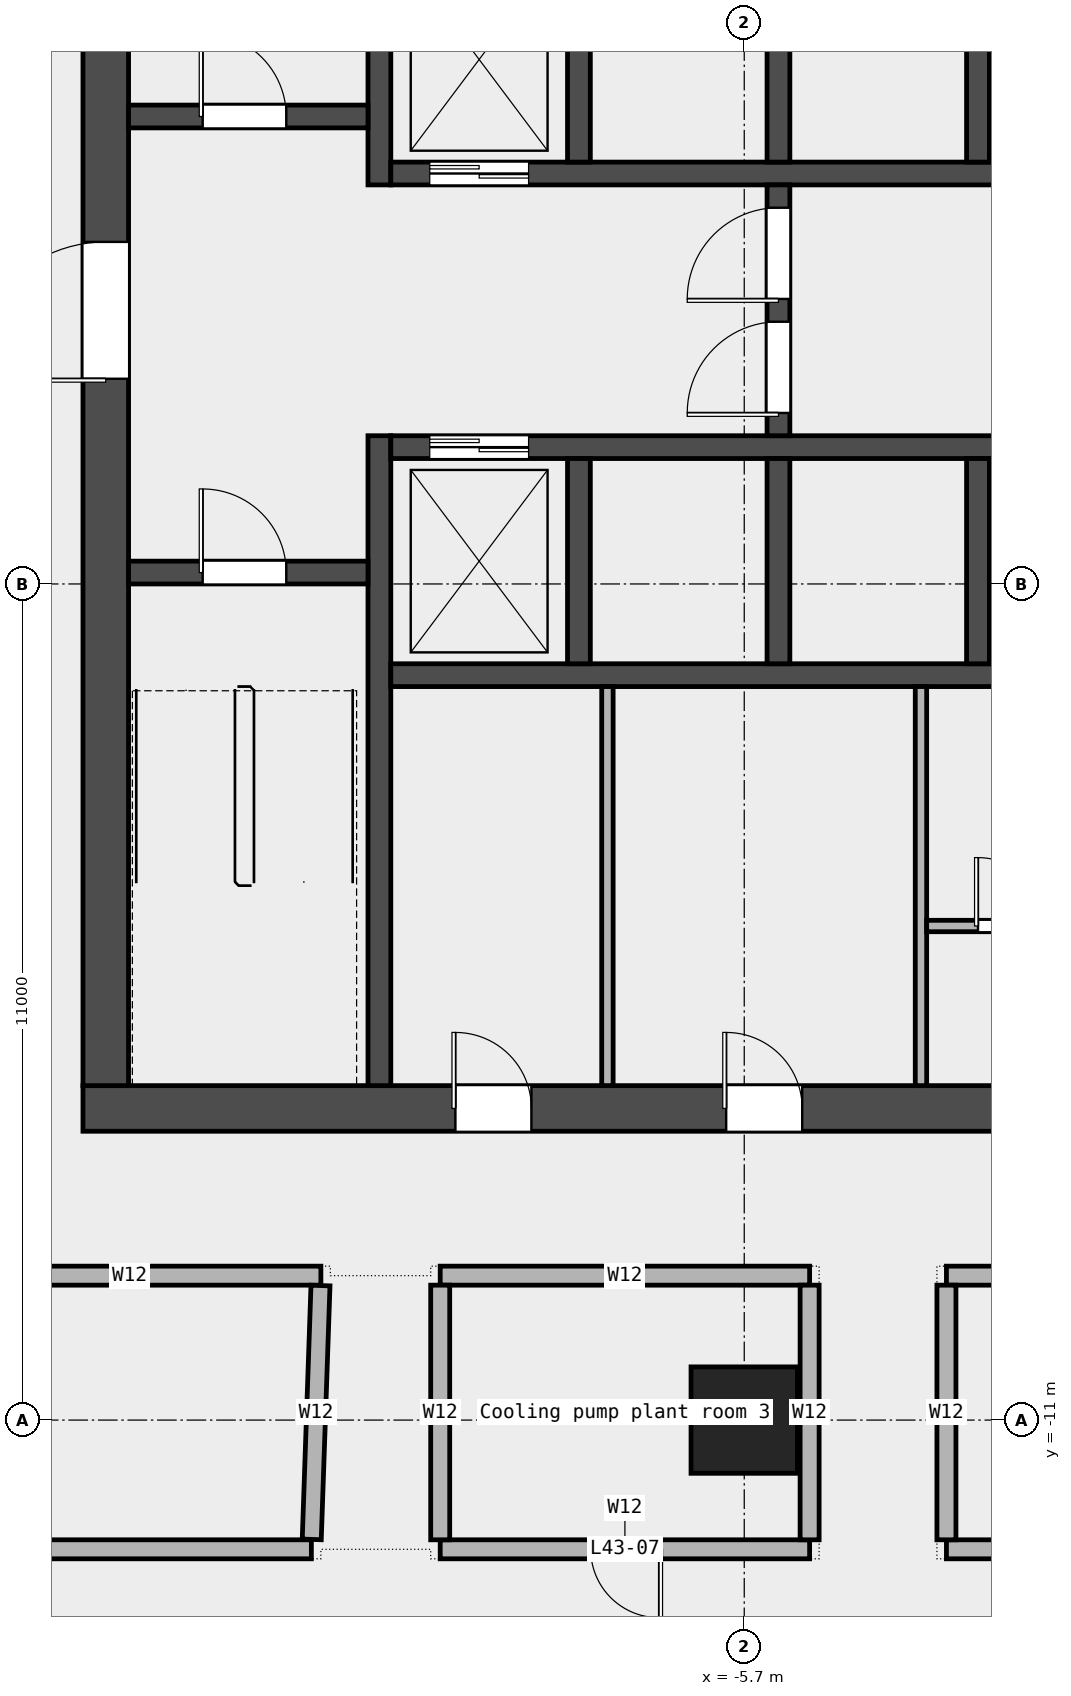
"""IFC4 building model, lengths in metres.
Left out: names, types, materials, properties, quantities, classifications, styles, units other than length and angle.
Written with IfcOpenShell. Run it as: python <this file> out.ifc"""

import sys

from ifc_helpers import new_model, si_unit, direction, frame, frame_2d, origin, origin_2d, place, context, subcontext, project, spatial, rectangle, extrude, element, fill, save


model = new_model("IFC4")
c1 = context("Model", 3, precision=1e-05, world=origin(), true_north=direction((0.0, 1.0)))
c2 = subcontext(c1, "Body", "Model", "MODEL_VIEW")
j1 = project(units=[si_unit("LENGTHUNIT", "METRE"), si_unit("PLANEANGLEUNIT", "RADIAN")], contexts=[c1])
p1 = place(None, origin())
s1 = spatial("IfcSite", under=j1, at=p1, CompositionType="ELEMENT")
p2 = place(p1, origin())
s2 = spatial("IfcBuilding", under=s1, at=p2, CompositionType="ELEMENT")
p3 = place(p2, frame((0.0, 0.0, 205.0)))
s3 = spatial("IfcBuildingStorey", under=s2, at=p3, CompositionType="ELEMENT", Elevation=205.0)
p4 = place(p3, frame((-5.7, -11.0, 0.0), z_axis=(0.0, 0.0, 1.0), x_axis=(1.0, 0.0, 0.0)))
e1 = element("IfcColumn", 1, at=p4, inside=s3, PredefinedType="COLUMN", context=c2, shape_type="SweptSolid", body=[
    extrude(rectangle(XDim=1.4, YDim=1.4, at=origin_2d()), origin(), (0.0, 0.0, 1.0), 5.6),
])
p5 = place(p3, frame((-24.45, -12.7, 0.0), z_axis=(0.0, 0.0, 1.0), x_axis=(1.0, 0.0, 0.0)))
e2 = element("IfcWall", 2, at=p5, inside=s3, PredefinedType="PARTITIONING", context=c2, shape_type="SweptSolid", body=[
    extrude(rectangle(XDim=13.055, YDim=0.25, at=frame_2d((6.527, 0.0))), origin(), (0.0, 0.0, 1.0), 5.6),
])
p6 = place(p5, frame((5.327, 0.0, 0.0)))
e3 = element("IfcOpeningElement", 3, at=p6, cuts=e2, PredefinedType="OPENING", context=c2, shape_type="SweptSolid", body=[
    extrude(rectangle(XDim=1.2, YDim=2.1, at=frame_2d((0.6, 1.05))), frame((0.0, 0.137, 0.0), z_axis=(0.0, -1.0, 0.0), x_axis=(1.0, 0.0, 0.0)), (0.0, 0.0, 1.0), 0.274),
])
p7 = place(p3, frame((-9.7, -12.7, 0.0), z_axis=(0.0, 0.0, 1.0), x_axis=(1.0, 0.0, 0.0)))
e4 = element("IfcWall", 4, at=p7, inside=s3, PredefinedType="PARTITIONING", context=c2, shape_type="SweptSolid", body=[
    extrude(rectangle(XDim=4.86, YDim=0.25, at=frame_2d((2.43, 0.0))), origin(), (0.0, 0.0, 1.0), 5.6),
])
p8 = place(p7, frame((1.98, 0.0, 0.0)))
e5 = element("IfcOpeningElement", 5, at=p8, cuts=e4, PredefinedType="OPENING", context=c2, shape_type="SweptSolid", body=[
    extrude(rectangle(XDim=0.9, YDim=2.1, at=frame_2d((0.45, 1.05))), frame((0.0, 0.137, 0.0), z_axis=(0.0, -1.0, 0.0), x_axis=(1.0, 0.0, 0.0)), (0.0, 0.0, 1.0), 0.274),
])
p9 = place(p3, frame((-3.04, -12.7, 0.0), z_axis=(0.0, 0.0, 1.0), x_axis=(1.0, 0.0, 0.0)))
e6 = element("IfcWall", 6, at=p9, inside=s3, PredefinedType="PARTITIONING", context=c2, shape_type="SweptSolid", body=[
    extrude(rectangle(XDim=12.74, YDim=0.25, at=frame_2d((6.37, 0.0))), origin(), (0.0, 0.0, 1.0), 5.6),
])
p10 = place(p3, frame((-16.3, -9.1, 0.0), z_axis=(0.0, 0.0, 1.0), x_axis=(1.0, 0.0, 0.0)))
e7 = element("IfcWall", 7, at=p10, inside=s3, PredefinedType="PARTITIONING", context=c2, shape_type="SweptSolid", body=[
    extrude(rectangle(XDim=5.03, YDim=0.25, at=frame_2d((2.515, 0.0))), origin(), (0.0, 0.0, 1.0), 5.6),
])
p11 = place(p3, frame((-9.7, -9.1, 0.0), z_axis=(0.0, 0.0, 1.0), x_axis=(1.0, 0.0, 0.0)))
e8 = element("IfcWall", 8, at=p11, inside=s3, PredefinedType="PARTITIONING", context=c2, shape_type="SweptSolid", body=[
    extrude(rectangle(XDim=4.86, YDim=0.25, at=frame_2d((2.43, 0.0))), origin(), (0.0, 0.0, 1.0), 5.6),
])
p12 = place(p3, frame((-3.04, -9.1, 0.0), z_axis=(0.0, 0.0, 1.0), x_axis=(1.0, 0.0, 0.0)))
e9 = element("IfcWall", 9, at=p12, inside=s3, PredefinedType="PARTITIONING", context=c2, shape_type="SweptSolid", body=[
    extrude(rectangle(XDim=12.74, YDim=0.25, at=frame_2d((6.37, 0.0))), origin(), (0.0, 0.0, 1.0), 5.6),
])
p13 = place(p12, frame((5.77, 0.0, 0.0)))
e10 = element("IfcOpeningElement", 10, at=p13, cuts=e9, PredefinedType="OPENING", context=c2, shape_type="SweptSolid", body=[
    extrude(rectangle(XDim=1.2, YDim=2.1, at=frame_2d((0.6, 1.05))), frame((0.0, 0.137, 0.0), z_axis=(0.0, -1.0, 0.0), x_axis=(1.0, 0.0, 0.0)), (0.0, 0.0, 1.0), 0.274),
])
for number, where, z_axis, x_axis in (
    (11, (-9.7, -12.575, 0.0), (0.0, 0.0, 1.0), (0.0, 1.0, 0.0)),
    (12, (-4.84, -12.575, 0.0), (0.0, 0.0, 1.0), (0.0, 1.0, 0.0)),
    (13, (-3.04, -12.575, 0.0), (0.0, 0.0, 1.0), (0.0, 1.0, 0.0)),
):
    element("IfcWall", number, at=place(p3, frame(where, z_axis=z_axis, x_axis=x_axis)), inside=s3, PredefinedType="PARTITIONING", context=c2, shape_type="SweptSolid", body=[
        extrude(rectangle(XDim=3.35, YDim=0.25, at=frame_2d((1.675, 0.0))), origin(), (0.0, 0.0, 1.0), 5.6),
    ])
p14 = place(p3, frame((-11.275, -9.23, 0.0), z_axis=(0.0, 0.0, 1.0), x_axis=(-0.03440692376, -0.999407906511, 0.0)))
e14 = element("IfcWall", 14, at=p14, inside=s3, PredefinedType="PARTITIONING", context=c2, shape_type="SweptSolid", body=[
    extrude(rectangle(XDim=3.342, YDim=0.25, at=frame_2d((1.671, 0.0))), origin(), (0.0, 0.0, 1.0), 5.6),
])
p15 = place(p3, frame((-14.4, -6.9, 0.0), z_axis=(0.0, 0.0, 1.0), x_axis=(1.0, 0.0, 0.0)))
e15 = element("IfcWall", 15, at=p15, inside=s3, PredefinedType="SHEAR", context=c2, shape_type="SweptSolid", body=[
    extrude(rectangle(XDim=28.8, YDim=0.6, at=frame_2d((14.4, 0.0))), origin(), (0.0, 0.0, 1.0), 5.7),
])
p16 = place(p15, frame((4.9, 0.0, 0.0)))
e16 = element("IfcOpeningElement", 16, at=p16, cuts=e15, PredefinedType="OPENING", context=c2, shape_type="SweptSolid", body=[
    extrude(rectangle(XDim=1.0, YDim=2.1, at=frame_2d((0.5, 1.05))), frame((0.0, 0.312, 0.0), z_axis=(0.0, -1.0, 0.0), x_axis=(1.0, 0.0, 0.0)), (0.0, 0.0, 1.0), 0.624),
])
p17 = place(p15, frame((8.462, 0.0, 0.0)))
e17 = element("IfcOpeningElement", 17, at=p17, cuts=e15, PredefinedType="OPENING", context=c2, shape_type="SweptSolid", body=[
    extrude(rectangle(XDim=1.0, YDim=2.1, at=frame_2d((0.5, 1.05))), frame((0.0, 0.312, 0.0), z_axis=(0.0, -1.0, 0.0), x_axis=(1.0, 0.0, 0.0)), (0.0, 0.0, 1.0), 0.624),
])
p18 = place(p15, frame((13.425, 0.0, 0.0)))
e18 = element("IfcOpeningElement", 18, at=p18, cuts=e15, PredefinedType="OPENING", context=c2, shape_type="SweptSolid", body=[
    extrude(rectangle(XDim=1.2, YDim=2.1, at=frame_2d((0.6, 1.05))), frame((0.0, 0.312, 0.0), z_axis=(0.0, -1.0, 0.0), x_axis=(1.0, 0.0, 0.0)), (0.0, 0.0, 1.0), 0.624),
])
p19 = place(p15, frame((18.75, 0.0, 0.0)))
e19 = element("IfcOpeningElement", 19, at=p19, cuts=e15, PredefinedType="OPENING", context=c2, shape_type="SweptSolid", body=[
    extrude(rectangle(XDim=1.8, YDim=2.1, at=frame_2d((0.9, 1.05))), frame((0.0, 0.312, 0.0), z_axis=(0.0, -1.0, 0.0), x_axis=(1.0, 0.0, 0.0)), (0.0, 0.0, 1.0), 0.624),
])
p20 = place(p15, frame((23.087, 0.0, 0.0)))
e20 = element("IfcOpeningElement", 20, at=p20, cuts=e15, PredefinedType="OPENING", context=c2, shape_type="SweptSolid", body=[
    extrude(rectangle(XDim=1.0, YDim=2.1, at=frame_2d((0.5, 1.05))), frame((0.0, 0.312, 0.0), z_axis=(0.0, -1.0, 0.0), x_axis=(1.0, 0.0, 0.0)), (0.0, 0.0, 1.0), 0.624),
])
p21 = place(p3, frame((-14.1, -6.6, 0.0), z_axis=(0.0, 0.0, 1.0), x_axis=(0.0, 1.0, 0.0)))
e21 = element("IfcWall", 21, at=p21, inside=s3, PredefinedType="SHEAR", context=c2, shape_type="SweptSolid", body=[
    extrude(rectangle(XDim=19.5, YDim=0.6, at=frame_2d((9.75, 0.0))), origin(), (0.0, 0.0, 1.0), 5.7),
])
p22 = place(p21, frame((9.3, 0.0, 0.0)))
e22 = element("IfcOpeningElement", 22, at=p22, cuts=e21, PredefinedType="OPENING", context=c2, shape_type="SweptSolid", body=[
    extrude(rectangle(XDim=1.8, YDim=2.1, at=frame_2d((0.9, 1.05))), frame((0.0, 0.312, 0.0), z_axis=(0.0, -1.0, 0.0), x_axis=(1.0, 0.0, 0.0)), (0.0, 0.0, 1.0), 0.624),
])
p23 = place(p3, frame((-10.5, -6.6, 0.0), z_axis=(0.0, 0.0, 1.0), x_axis=(0.0, 1.0, 0.0)))
e23 = element("IfcWall", 23, at=p23, inside=s3, PredefinedType="SHEAR", context=c2, shape_type="SweptSolid", body=[
    extrude(rectangle(XDim=8.55, YDim=0.3, at=frame_2d((4.275, 0.0))), origin(), (0.0, 0.0, 1.0), 5.7),
])
p24 = place(p3, frame((-10.5, 5.25, 0.0), z_axis=(0.0, 0.0, 1.0), x_axis=(0.0, 1.0, 0.0)))
e24 = element("IfcWall", 24, at=p24, inside=s3, PredefinedType="SHEAR", context=c2, shape_type="SweptSolid", body=[
    extrude(rectangle(XDim=7.65, YDim=0.3, at=frame_2d((3.825, 0.0))), origin(), (0.0, 0.0, 1.0), 5.7),
])
p25 = place(p3, frame((-13.8, 0.15, 0.0), z_axis=(0.0, 0.0, 1.0), x_axis=(1.0, 0.0, 0.0)))
e25 = element("IfcWall", 25, at=p25, inside=s3, PredefinedType="SOLIDWALL", context=c2, shape_type="SweptSolid", body=[
    extrude(rectangle(XDim=3.15, YDim=0.3, at=frame_2d((1.575, 0.0))), origin(), (0.0, 0.0, 1.0), 5.7),
])
p26 = place(p25, frame((0.975, 0.0, 0.0)))
e26 = element("IfcOpeningElement", 26, at=p26, cuts=e25, PredefinedType="OPENING", context=c2, shape_type="SweptSolid", body=[
    extrude(rectangle(XDim=1.1, YDim=2.1, at=frame_2d((0.55, 1.05))), frame((0.0, 0.162, 0.0), z_axis=(0.0, -1.0, 0.0), x_axis=(1.0, 0.0, 0.0)), (0.0, 0.0, 1.0), 0.324),
])
p27 = place(p3, frame((-13.8, 6.15, 0.0), z_axis=(0.0, 0.0, 1.0), x_axis=(1.0, 0.0, 0.0)))
e27 = element("IfcWall", 27, at=p27, inside=s3, PredefinedType="SOLIDWALL", context=c2, shape_type="SweptSolid", body=[
    extrude(rectangle(XDim=3.15, YDim=0.3, at=frame_2d((1.575, 0.0))), origin(), (0.0, 0.0, 1.0), 5.7),
])
p28 = place(p27, frame((0.975, 0.0, 0.0)))
e28 = element("IfcOpeningElement", 28, at=p28, cuts=e27, PredefinedType="OPENING", context=c2, shape_type="SweptSolid", body=[
    extrude(rectangle(XDim=1.1, YDim=2.1, at=frame_2d((0.55, 1.05))), frame((0.0, 0.162, 0.0), z_axis=(0.0, -1.0, 0.0), x_axis=(1.0, 0.0, 0.0)), (0.0, 0.0, 1.0), 0.324),
])
p29 = place(p3, frame((-10.35, -1.2, 0.0), z_axis=(0.0, 0.0, 1.0), x_axis=(1.0, 0.0, 0.0)))
e29 = element("IfcWall", 29, at=p29, inside=s3, PredefinedType="SOLIDWALL", context=c2, shape_type="SweptSolid", body=[
    extrude(rectangle(XDim=20.7, YDim=0.3, at=frame_2d((10.35, 0.0))), origin(), (0.0, 0.0, 1.0), 5.7),
])
p30 = place(p3, frame((-10.35, 1.8, 0.0), z_axis=(0.0, 0.0, 1.0), x_axis=(1.0, 0.0, 0.0)))
e30 = element("IfcWall", 30, at=p30, inside=s3, PredefinedType="SOLIDWALL", context=c2, shape_type="SweptSolid", body=[
    extrude(rectangle(XDim=20.7, YDim=0.3, at=frame_2d((10.35, 0.0))), origin(), (0.0, 0.0, 1.0), 5.7),
])
p31 = place(p30, frame((0.512, 0.0, 0.0)))
e31 = element("IfcOpeningElement", 31, at=p31, cuts=e30, PredefinedType="OPENING", context=c2, shape_type="SweptSolid", body=[
    extrude(rectangle(XDim=1.3, YDim=2.1, at=frame_2d((0.65, 1.05))), frame((0.0, 0.162, 0.0), z_axis=(0.0, -1.0, 0.0), x_axis=(1.0, 0.0, 0.0)), (0.0, 0.0, 1.0), 0.324),
])
p32 = place(p3, frame((-10.35, 5.4, 0.0), z_axis=(0.0, 0.0, 1.0), x_axis=(1.0, 0.0, 0.0)))
e32 = element("IfcWall", 32, at=p32, inside=s3, PredefinedType="SOLIDWALL", context=c2, shape_type="SweptSolid", body=[
    extrude(rectangle(XDim=20.7, YDim=0.3, at=frame_2d((10.35, 0.0))), origin(), (0.0, 0.0, 1.0), 5.7),
])
p33 = place(p32, frame((0.512, 0.0, 0.0)))
e33 = element("IfcOpeningElement", 33, at=p33, cuts=e32, PredefinedType="OPENING", context=c2, shape_type="SweptSolid", body=[
    extrude(rectangle(XDim=1.3, YDim=2.1, at=frame_2d((0.65, 1.05))), frame((0.0, 0.162, 0.0), z_axis=(0.0, -1.0, 0.0), x_axis=(1.0, 0.0, 0.0)), (0.0, 0.0, 1.0), 0.324),
])
for number, where, z_axis, x_axis in (
    (34, (-7.875, -1.05, 0.0), (0.0, 0.0, 1.0), (0.0, 1.0, 0.0)),
    (35, (-5.25, -1.05, 0.0), (0.0, 0.0, 1.0), (0.0, 1.0, 0.0)),
    (36, (-2.625, -1.05, 0.0), (0.0, 0.0, 1.0), (0.0, 1.0, 0.0)),
    (37, (-7.875, 5.55, 0.0), (0.0, 0.0, 1.0), (0.0, 1.0, 0.0)),
    (38, (-5.25, 5.55, 0.0), (0.0, 0.0, 1.0), (0.0, 1.0, 0.0)),
    (39, (-2.625, 5.55, 0.0), (0.0, 0.0, 1.0), (0.0, 1.0, 0.0)),
):
    element("IfcWall", number, at=place(p3, frame(where, z_axis=z_axis, x_axis=x_axis)), inside=s3, PredefinedType="SOLIDWALL", context=c2, shape_type="SweptSolid", body=[
        extrude(rectangle(XDim=2.7, YDim=0.3, at=frame_2d((1.35, 0.0))), origin(), (0.0, 0.0, 1.0), 5.7),
    ])
p34 = place(p3, frame((-5.25, 1.95, 0.0), z_axis=(0.0, 0.0, 1.0), x_axis=(0.0, 1.0, 0.0)))
e40 = element("IfcWall", 40, at=p34, inside=s3, PredefinedType="SOLIDWALL", context=c2, shape_type="SweptSolid", body=[
    extrude(rectangle(XDim=3.3, YDim=0.3, at=frame_2d((1.65, 0.0))), origin(), (0.0, 0.0, 1.0), 5.7),
])
p35 = place(p34, frame((0.3, 0.0, 0.0)))
e41 = element("IfcOpeningElement", 41, at=p35, cuts=e40, PredefinedType="OPENING", context=c2, shape_type="SweptSolid", body=[
    extrude(rectangle(XDim=1.2, YDim=2.1, at=frame_2d((0.6, 1.05))), frame((0.0, 0.162, 0.0), z_axis=(0.0, -1.0, 0.0), x_axis=(1.0, 0.0, 0.0)), (0.0, 0.0, 1.0), 0.324),
])
p36 = place(p34, frame((1.8, 0.0, 0.0)))
e42 = element("IfcOpeningElement", 42, at=p36, cuts=e40, PredefinedType="OPENING", context=c2, shape_type="SweptSolid", body=[
    extrude(rectangle(XDim=1.2, YDim=2.1, at=frame_2d((0.6, 1.05))), frame((0.0, 0.162, 0.0), z_axis=(0.0, -1.0, 0.0), x_axis=(1.0, 0.0, 0.0)), (0.0, 0.0, 1.0), 0.324),
])
for number, where, z_axis, x_axis in (
    (43, (-7.5, -6.6, 0.0), (0.0, 0.0, 1.0), (0.0, 1.0, 0.0)),
    (44, (-3.375, -6.6, 0.0), (0.0, 0.0, 1.0), (0.0, 1.0, 0.0)),
):
    element("IfcWall", number, at=place(p3, frame(where, z_axis=z_axis, x_axis=x_axis)), inside=s3, PredefinedType="PARTITIONING", context=c2, shape_type="SweptSolid", body=[
        extrude(rectangle(XDim=5.25, YDim=0.15, at=frame_2d((2.625, 0.0))), origin(), (0.0, 0.0, 1.0), 5.7),
    ])
p37 = place(p3, frame((-3.3, -4.5, 0.0), z_axis=(0.0, 0.0, 1.0), x_axis=(1.0, 0.0, 0.0)))
e45 = element("IfcWall", 45, at=p37, inside=s3, PredefinedType="PARTITIONING", context=c2, shape_type="SweptSolid", body=[
    extrude(rectangle(XDim=5.775, YDim=0.15, at=frame_2d((2.888, 0.0))), origin(), (0.0, 0.0, 1.0), 5.7),
])
p38 = place(p37, frame((0.675, 0.0, 0.0)))
e46 = element("IfcOpeningElement", 46, at=p38, cuts=e45, PredefinedType="OPENING", context=c2, shape_type="SweptSolid", body=[
    extrude(rectangle(XDim=0.9, YDim=2.1, at=frame_2d((0.45, 1.05))), frame((0.0, 0.087, 0.0), z_axis=(0.0, -1.0, 0.0), x_axis=(1.0, 0.0, 0.0)), (0.0, 0.0, 1.0), 0.174),
])
p39 = place(p37, frame((3.015, 0.0, 0.0)))
e47 = element("IfcOpeningElement", 47, at=p39, cuts=e45, PredefinedType="OPENING", context=c2, shape_type="SweptSolid", body=[
    extrude(rectangle(XDim=0.9, YDim=2.1, at=frame_2d((0.45, 1.05))), frame((0.0, 0.087, 0.0), z_axis=(0.0, -1.0, 0.0), x_axis=(1.0, 0.0, 0.0)), (0.0, 0.0, 1.0), 0.174),
])
p40 = place(p37, frame((4.79, 0.0, 0.0)))
e48 = element("IfcOpeningElement", 48, at=p40, cuts=e45, PredefinedType="OPENING", context=c2, shape_type="SweptSolid", body=[
    extrude(rectangle(XDim=0.95, YDim=2.1, at=frame_2d((0.475, 1.05))), frame((0.0, 0.087, 0.0), z_axis=(0.0, -1.0, 0.0), x_axis=(1.0, 0.0, 0.0)), (0.0, 0.0, 1.0), 0.174),
])
p41 = place(p8, origin())
e49 = element("IfcDoor", 49, at=p41, inside=s3, OperationType="SINGLE_SWING_LEFT", PredefinedType="DOOR", context=c2, shape_type="SweptSolid", body=[
    extrude(rectangle(XDim=0.9, YDim=2.1, at=frame_2d((0.45, 1.05))), frame((0.0, 0.025, 0.0), z_axis=(0.0, -1.0, 0.0), x_axis=(1.0, 0.0, 0.0)), (0.0, 0.0, 1.0), 0.05),
])
fill(e5, e49)
p42 = place(p26, origin())
e50 = element("IfcDoor", 50, at=p42, inside=s3, OperationType="SINGLE_SWING_LEFT", PredefinedType="DOOR", context=c2, shape_type="SweptSolid", body=[
    extrude(rectangle(XDim=1.1, YDim=2.1, at=frame_2d((0.55, 1.05))), frame((0.0, 0.025, 0.0), z_axis=(0.0, -1.0, 0.0), x_axis=(1.0, 0.0, 0.0)), (0.0, 0.0, 1.0), 0.05),
])
fill(e26, e50)
p43 = place(p28, origin())
e51 = element("IfcDoor", 51, at=p43, inside=s3, OperationType="SINGLE_SWING_LEFT", PredefinedType="DOOR", context=c2, shape_type="SweptSolid", body=[
    extrude(rectangle(XDim=1.1, YDim=2.1, at=frame_2d((0.55, 1.05))), frame((0.0, 0.025, 0.0), z_axis=(0.0, -1.0, 0.0), x_axis=(1.0, 0.0, 0.0)), (0.0, 0.0, 1.0), 0.05),
])
fill(e28, e51)
p44 = place(p22, origin())
e52 = element("IfcDoor", 52, at=p44, inside=s3, OperationType="DOUBLE_DOOR_SINGLE_SWING", PredefinedType="DOOR", context=c2, shape_type="SweptSolid", body=[
    extrude(rectangle(XDim=1.8, YDim=2.1, at=frame_2d((0.9, 1.05))), frame((0.0, 0.025, 0.0), z_axis=(0.0, -1.0, 0.0), x_axis=(1.0, 0.0, 0.0)), (0.0, 0.0, 1.0), 0.05),
])
fill(e22, e52)
p45 = place(p35, origin())
e53 = element("IfcDoor", 53, at=p45, inside=s3, OperationType="SINGLE_SWING_LEFT", PredefinedType="DOOR", context=c2, shape_type="SweptSolid", body=[
    extrude(rectangle(XDim=1.2, YDim=2.1, at=frame_2d((0.6, 1.05))), frame((0.0, 0.025, 0.0), z_axis=(0.0, -1.0, 0.0), x_axis=(1.0, 0.0, 0.0)), (0.0, 0.0, 1.0), 0.05),
])
fill(e41, e53)
p46 = place(p36, origin())
e54 = element("IfcDoor", 54, at=p46, inside=s3, OperationType="SINGLE_SWING_RIGHT", PredefinedType="DOOR", context=c2, shape_type="SweptSolid", body=[
    extrude(rectangle(XDim=1.2, YDim=2.1, at=frame_2d((0.6, 1.05))), frame((0.0, 0.025, 0.0), z_axis=(0.0, -1.0, 0.0), x_axis=(1.0, 0.0, 0.0)), (0.0, 0.0, 1.0), 0.05),
])
fill(e42, e54)
p47 = place(p31, origin())
e55 = element("IfcDoor", 55, at=p47, inside=s3, OperationType="DOUBLE_DOOR_SLIDING", PredefinedType="DOOR", context=c2, shape_type="SweptSolid", body=[
    extrude(rectangle(XDim=1.3, YDim=2.1, at=frame_2d((0.65, 1.05))), frame((0.0, 0.025, 0.0), z_axis=(0.0, -1.0, 0.0), x_axis=(1.0, 0.0, 0.0)), (0.0, 0.0, 1.0), 0.05),
])
fill(e31, e55)
p48 = place(p33, origin())
e56 = element("IfcDoor", 56, at=p48, inside=s3, OperationType="DOUBLE_DOOR_SLIDING", PredefinedType="DOOR", context=c2, shape_type="SweptSolid", body=[
    extrude(rectangle(XDim=1.3, YDim=2.1, at=frame_2d((0.65, 1.05))), frame((0.0, 0.025, 0.0), z_axis=(0.0, -1.0, 0.0), x_axis=(1.0, 0.0, 0.0)), (0.0, 0.0, 1.0), 0.05),
])
fill(e33, e56)
p49 = place(p16, origin())
e57 = element("IfcDoor", 57, at=p49, inside=s3, OperationType="SINGLE_SWING_LEFT", PredefinedType="DOOR", context=c2, shape_type="SweptSolid", body=[
    extrude(rectangle(XDim=1.0, YDim=2.1, at=frame_2d((0.5, 1.05))), frame((0.0, 0.025, 0.0), z_axis=(0.0, -1.0, 0.0), x_axis=(1.0, 0.0, 0.0)), (0.0, 0.0, 1.0), 0.05),
])
fill(e16, e57)
p50 = place(p17, origin())
e58 = element("IfcDoor", 58, at=p50, inside=s3, OperationType="SINGLE_SWING_LEFT", PredefinedType="DOOR", context=c2, shape_type="SweptSolid", body=[
    extrude(rectangle(XDim=1.0, YDim=2.1, at=frame_2d((0.5, 1.05))), frame((0.0, 0.025, 0.0), z_axis=(0.0, -1.0, 0.0), x_axis=(1.0, 0.0, 0.0)), (0.0, 0.0, 1.0), 0.05),
])
fill(e17, e58)
p51 = place(p38, origin())
e59 = element("IfcDoor", 59, at=p51, inside=s3, OperationType="SINGLE_SWING_LEFT", PredefinedType="DOOR", context=c2, shape_type="SweptSolid", body=[
    extrude(rectangle(XDim=0.9, YDim=2.1, at=frame_2d((0.45, 1.05))), frame((0.0, 0.025, 0.0), z_axis=(0.0, -1.0, 0.0), x_axis=(1.0, 0.0, 0.0)), (0.0, 0.0, 1.0), 0.05),
])
fill(e46, e59)
save(model, sys.argv[1])
